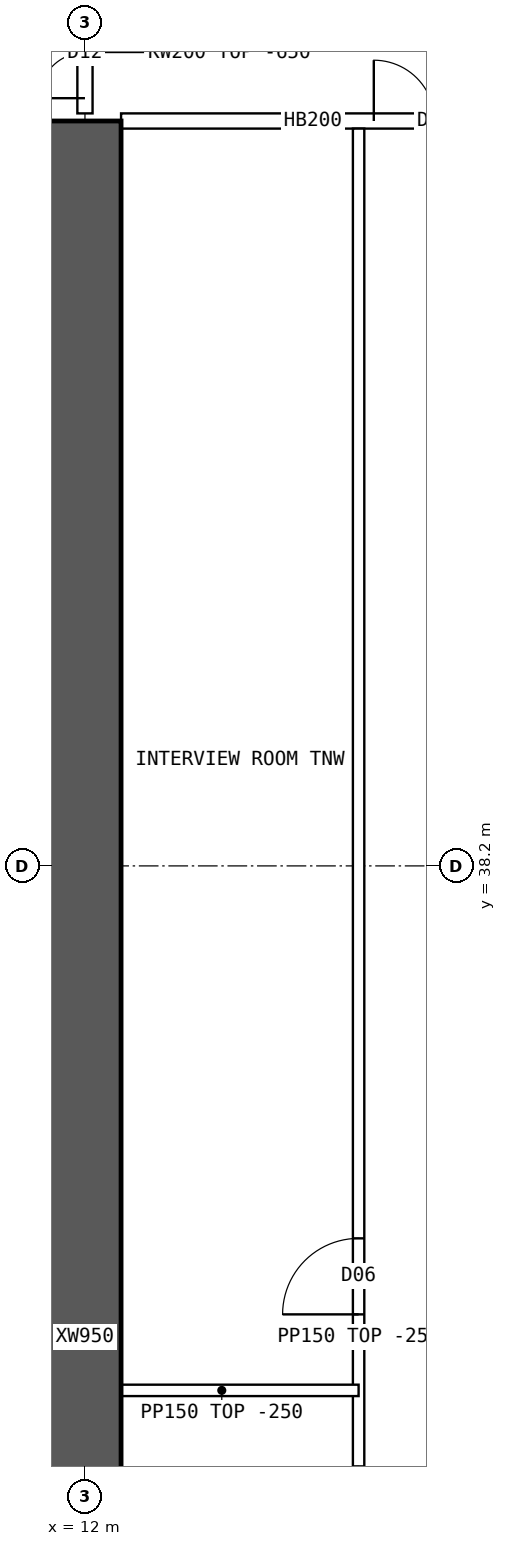
"""IFC4 building model, lengths in metres.
Left out: names, types, materials, properties, quantities, classifications, styles, units other than length and angle.
Written with IfcOpenShell. Run it as: python <this file> out.ifc"""

import sys

from ifc_helpers import new_model, si_unit, direction, frame, frame_2d, origin, place, context, subcontext, project, spatial, polyline, rectangle, outline, extrude, element, fill, save


model = new_model("IFC4")
c1 = context("Model", 3, precision=1e-05, world=origin(), true_north=direction((0.0, 1.0)))
c2 = subcontext(c1, "Body", "Model", "MODEL_VIEW")
j1 = project(units=[si_unit("LENGTHUNIT", "METRE"), si_unit("PLANEANGLEUNIT", "RADIAN")], contexts=[c1])
p1 = place(None, origin())
s1 = spatial("IfcSite", under=j1, at=p1, CompositionType="ELEMENT")
p2 = place(p1, origin())
s2 = spatial("IfcBuilding", under=s1, at=p2, CompositionType="ELEMENT")
p3 = place(p2, frame((0.0, 0.0, 114.4)))
s3 = spatial("IfcBuildingStorey", under=s2, at=p3, CompositionType="ELEMENT", Elevation=114.4)
p4 = place(p3, frame((12.0, 16.0, 0.0), z_axis=(0.0, 0.0, 1.0), x_axis=(0.0, 1.0, 0.0)))
e1 = element("IfcWall", 1, at=p4, inside=s3, PredefinedType="SHEAR", context=c2, shape_type="SweptSolid", body=[
    extrude(rectangle(XDim=32.0, YDim=0.95, at=frame_2d((16.0, 0.0))), origin(), (0.0, 0.0, 1.0), 3.75),
])
p5 = place(p3, frame((12.475, 48.0, 0.0), z_axis=(0.0, 0.0, 1.0), x_axis=(1.0, 0.0, 0.0)))
e2 = element("IfcWall", 2, at=p5, inside=s3, PredefinedType="SOLIDWALL", context=c2, shape_type="SweptSolid", body=[
    extrude(rectangle(XDim=5.05, YDim=0.2, at=frame_2d((2.525, 0.0))), origin(), (0.0, 0.0, 1.0), 3.5),
])
p6 = place(p5, frame((3.325, 0.0, 0.0)))
e3 = element("IfcOpeningElement", 3, at=p6, cuts=e2, PredefinedType="OPENING", context=c2, shape_type="SweptSolid", body=[
    extrude(rectangle(XDim=1.6, YDim=2.1, at=frame_2d((0.8, 1.05))), frame((0.0, 0.11, 0.0), z_axis=(0.0, -1.0, 0.0), x_axis=(1.0, 0.0, 0.0)), (0.0, 0.0, 1.0), 0.22),
])
p7 = place(p3, frame((15.6, 16.1, 0.0), z_axis=(0.0, 0.0, 1.0), x_axis=(0.0, 1.0, 0.0)))
e4 = element("IfcWall", 4, at=p7, inside=s3, PredefinedType="PARTITIONING", context=c2, shape_type="SweptSolid", body=[
    extrude(rectangle(XDim=31.8, YDim=0.15, at=frame_2d((15.9, 0.0))), origin(), (0.0, 0.0, 1.0), 3.5),
])
p8 = place(p7, frame((13.2, 0.0, 0.0)))
e5 = element("IfcOpeningElement", 5, at=p8, cuts=e4, PredefinedType="OPENING", context=c2, shape_type="SweptSolid", body=[
    extrude(rectangle(XDim=1.0, YDim=2.1, at=frame_2d((0.5, 1.05))), frame((0.0, 0.085, 0.0), z_axis=(0.0, -1.0, 0.0), x_axis=(1.0, 0.0, 0.0)), (0.0, 0.0, 1.0), 0.17),
])
p9 = place(p7, frame((16.2, 0.0, 0.0)))
e6 = element("IfcOpeningElement", 6, at=p9, cuts=e4, PredefinedType="OPENING", context=c2, shape_type="SweptSolid", body=[
    extrude(rectangle(XDim=1.0, YDim=2.1, at=frame_2d((0.5, 1.05))), frame((0.0, 0.085, 0.0), z_axis=(0.0, -1.0, 0.0), x_axis=(1.0, 0.0, 0.0)), (0.0, 0.0, 1.0), 0.17),
])
p10 = place(p3, frame((12.0, 31.3, 0.0), z_axis=(0.0, 0.0, 1.0), x_axis=(1.0, 0.0, 0.0)))
e7 = element("IfcWall", 7, at=p10, inside=s3, PredefinedType="PARTITIONING", context=c2, shape_type="SweptSolid", body=[
    extrude(rectangle(XDim=3.6, YDim=0.15, at=frame_2d((1.8, 0.0))), origin(), (0.0, 0.0, 1.0), 3.5),
])
p11 = place(p3, frame((3.905, 30.85, 0.0), z_axis=(0.0, 0.0, 1.0), x_axis=(1.0, 0.0, 0.0)))
e8 = element("IfcWall", 8, at=p11, inside=s3, PredefinedType="PARTITIONING", context=c2, shape_type="SweptSolid", body=[
    extrude(outline(polyline([(0.0, 0.0), (8.02, 0.0), (8.02, 3.5), (2.397, 3.5), (2.395, 3.05), (1.797, 3.05), (1.795, 3.5), (0.0, 3.5), (0.0, 0.0)])), frame((0.0, 0.075, 0.0), z_axis=(0.0, -1.0, 0.0), x_axis=(1.0, 0.0, 0.0)), (0.0, 0.0, 1.0), 0.15),
])
p12 = place(p3, frame((12.0, 48.1, 0.0), z_axis=(0.0, 0.0, 1.0), x_axis=(0.0, 1.0, 0.0)))
e9 = element("IfcWall", 9, at=p12, inside=s3, PredefinedType="SOLIDWALL", context=c2, shape_type="SweptSolid", body=[
    extrude(outline(polyline([(0.0, 0.0), (1.6, 0.0), (1.6, 3.1), (0.0, 3.1), (0.0, 0.0)])), frame((0.0, 0.1, 0.0), z_axis=(0.0, -1.0, 0.0), x_axis=(1.0, 0.0, 0.0)), (0.0, 0.0, 1.0), 0.2),
])
p13 = place(p12, frame((0.2, 0.0, 0.0)))
e10 = element("IfcOpeningElement", 10, at=p13, cuts=e9, PredefinedType="OPENING", context=c2, shape_type="SweptSolid", body=[
    extrude(rectangle(XDim=1.2, YDim=2.1, at=frame_2d((0.6, 1.05))), frame((0.0, 0.11, 0.0), z_axis=(0.0, -1.0, 0.0), x_axis=(1.0, 0.0, 0.0)), (0.0, 0.0, 1.0), 0.22),
])
p14 = place(p6, origin())
e11 = element("IfcDoor", 11, at=p14, inside=s3, OperationType="DOUBLE_DOOR_SINGLE_SWING", PredefinedType="DOOR", context=c2, shape_type="SweptSolid", body=[
    extrude(rectangle(XDim=1.6, YDim=2.1, at=frame_2d((0.8, 1.05))), frame((0.0, 0.025, 0.0), z_axis=(0.0, -1.0, 0.0), x_axis=(1.0, 0.0, 0.0)), (0.0, 0.0, 1.0), 0.05),
])
fill(e3, e11)
p15 = place(p9, origin())
e12 = element("IfcDoor", 12, at=p15, inside=s3, OperationType="SINGLE_SWING_LEFT", PredefinedType="DOOR", context=c2, shape_type="SweptSolid", body=[
    extrude(rectangle(XDim=1.0, YDim=2.1, at=frame_2d((0.5, 1.05))), frame((0.0, 0.025, 0.0), z_axis=(0.0, -1.0, 0.0), x_axis=(1.0, 0.0, 0.0)), (0.0, 0.0, 1.0), 0.05),
])
fill(e6, e12)
p16 = place(p13, origin())
e13 = element("IfcDoor", 13, at=p16, inside=s3, OperationType="DOUBLE_DOOR_SINGLE_SWING", PredefinedType="DOOR", context=c2, shape_type="SweptSolid", body=[
    extrude(rectangle(XDim=1.2, YDim=2.1, at=frame_2d((0.6, 1.05))), frame((0.0, 0.025, 0.0), z_axis=(0.0, -1.0, 0.0), x_axis=(1.0, 0.0, 0.0)), (0.0, 0.0, 1.0), 0.05),
])
fill(e10, e13)
save(model, sys.argv[1])
